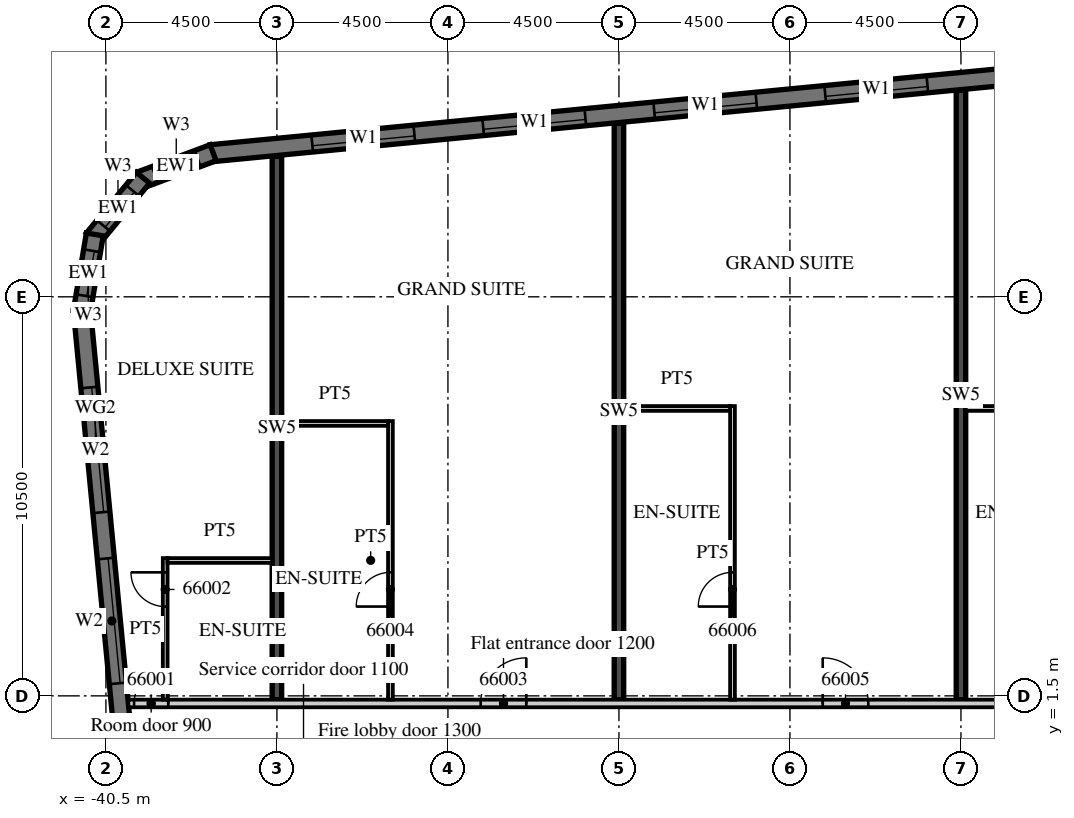
"""IFC4 building model, lengths in metres.
Left out: names, types, materials, properties, quantities, classifications, styles, units other than length and angle.
Written with IfcOpenShell. Run it as: python <this file> out.ifc"""

import sys

from ifc_helpers import new_model, si_unit, direction, frame, frame_2d, origin, place, context, subcontext, project, spatial, polyline, rectangle, outline, extrude, element, fill, save


model = new_model("IFC4")
c1 = context("Model", 3, precision=1e-05, world=origin(), true_north=direction((0.0, 1.0)))
c2 = subcontext(c1, "Body", "Model", "MODEL_VIEW")
j1 = project(units=[si_unit("LENGTHUNIT", "METRE"), si_unit("PLANEANGLEUNIT", "RADIAN")], contexts=[c1])
p1 = place(None, origin())
s1 = spatial("IfcSite", under=j1, at=p1, CompositionType="ELEMENT")
p2 = place(p1, origin())
s2 = spatial("IfcBuilding", under=s1, at=p2, CompositionType="ELEMENT")
p3 = place(p2, frame((0.0, 0.0, 268.5)))
s3 = spatial("IfcBuildingStorey", under=s2, at=p3, CompositionType="ELEMENT", Elevation=268.5)
p4 = place(p3, frame((-36.0, 1.4, 0.0), z_axis=(0.0, 0.0, 1.0), x_axis=(0.0, 1.0, 0.0)))
e1 = element("IfcWall", 1, at=p4, inside=s3, PredefinedType="SHEAR", context=c2, shape_type="SweptSolid", body=[
    extrude(rectangle(XDim=14.296, YDim=0.25, at=frame_2d((7.148, 0.0))), origin(), (0.0, 0.0, 1.0), 3.3),
])
p5 = place(p3, frame((-27.0, 1.4, 0.0), z_axis=(0.0, 0.0, 1.0), x_axis=(0.0, 1.0, 0.0)))
e2 = element("IfcWall", 2, at=p5, inside=s3, PredefinedType="SHEAR", context=c2, shape_type="SweptSolid", body=[
    extrude(rectangle(XDim=15.163, YDim=0.25, at=frame_2d((7.582, 0.0))), origin(), (0.0, 0.0, 1.0), 3.3),
])
p6 = place(p3, frame((-18.0, 1.4, 0.0), z_axis=(0.0, 0.0, 1.0), x_axis=(0.0, 1.0, 0.0)))
e3 = element("IfcWall", 3, at=p6, inside=s3, PredefinedType="SHEAR", context=c2, shape_type="SweptSolid", body=[
    extrude(rectangle(XDim=16.03, YDim=0.25, at=frame_2d((8.015, 0.0))), origin(), (0.0, 0.0, 1.0), 3.3),
])
p7 = place(p3, frame((-41.132, 11.658, 0.0), z_axis=(0.0, 0.0, 1.0), x_axis=(0.095847749461, -0.995396006082, 0.0)))
e4 = element("IfcWall", 4, at=p7, inside=s3, PredefinedType="SOLIDWALL", context=c2, shape_type="SweptSolid", body=[
    extrude(rectangle(XDim=32.0, YDim=0.45, at=frame_2d((16.0, 0.0))), origin(), (0.0, 0.0, 1.0), 3.02),
])
p8 = place(p7, frame((2.053, 0.0, 0.45)))
e5 = element("IfcOpeningElement", 5, at=p8, cuts=e4, PredefinedType="OPENING", context=c2, shape_type="SweptSolid", body=[
    extrude(rectangle(XDim=3.3, YDim=2.25, at=frame_2d((1.65, 1.125))), frame((0.0, 0.235, 0.0), z_axis=(0.0, -1.0, 0.0), x_axis=(1.0, 0.0, 0.0)), (0.0, 0.0, 1.0), 0.47),
])
p9 = place(p7, frame((6.574, 0.0, 0.45)))
e6 = element("IfcOpeningElement", 6, at=p9, cuts=e4, PredefinedType="OPENING", context=c2, shape_type="SweptSolid", body=[
    extrude(rectangle(XDim=3.3, YDim=2.25, at=frame_2d((1.65, 1.125))), frame((0.0, 0.235, 0.0), z_axis=(0.0, -1.0, 0.0), x_axis=(1.0, 0.0, 0.0)), (0.0, 0.0, 1.0), 0.47),
])
p10 = place(p3, frame((13.521, 20.713, 0.0), z_axis=(0.0, 0.0, 1.0), x_axis=(-0.995396277313, -0.095844932638, 0.0)))
e7 = element("IfcWall", 7, at=p10, inside=s3, PredefinedType="SOLIDWALL", context=c2, shape_type="SweptSolid", body=[
    extrude(rectangle(XDim=51.495, YDim=0.45, at=frame_2d((25.748, 0.0))), origin(), (0.0, 0.0, 1.0), 3.02),
])
p11 = place(p10, frame((0.91, 0.0, 0.45)))
e8 = element("IfcOpeningElement", 8, at=p11, cuts=e7, PredefinedType="OPENING", context=c2, shape_type="SweptSolid", body=[
    extrude(rectangle(XDim=2.7, YDim=2.25, at=frame_2d((1.35, 1.125))), frame((0.0, 0.235, 0.0), z_axis=(0.0, -1.0, 0.0), x_axis=(1.0, 0.0, 0.0)), (0.0, 0.0, 1.0), 0.47),
])
p12 = place(p10, frame((5.431, 0.0, 0.45)))
e9 = element("IfcOpeningElement", 9, at=p12, cuts=e7, PredefinedType="OPENING", context=c2, shape_type="SweptSolid", body=[
    extrude(rectangle(XDim=2.7, YDim=2.25, at=frame_2d((1.35, 1.125))), frame((0.0, 0.235, 0.0), z_axis=(0.0, -1.0, 0.0), x_axis=(1.0, 0.0, 0.0)), (0.0, 0.0, 1.0), 0.47),
])
p13 = place(p10, frame((9.952, 0.0, 0.45)))
e10 = element("IfcOpeningElement", 10, at=p13, cuts=e7, PredefinedType="OPENING", context=c2, shape_type="SweptSolid", body=[
    extrude(rectangle(XDim=2.7, YDim=2.25, at=frame_2d((1.35, 1.125))), frame((0.0, 0.235, 0.0), z_axis=(0.0, -1.0, 0.0), x_axis=(1.0, 0.0, 0.0)), (0.0, 0.0, 1.0), 0.47),
])
p14 = place(p10, frame((14.473, 0.0, 0.45)))
e11 = element("IfcOpeningElement", 11, at=p14, cuts=e7, PredefinedType="OPENING", context=c2, shape_type="SweptSolid", body=[
    extrude(rectangle(XDim=2.7, YDim=2.25, at=frame_2d((1.35, 1.125))), frame((0.0, 0.235, 0.0), z_axis=(0.0, -1.0, 0.0), x_axis=(1.0, 0.0, 0.0)), (0.0, 0.0, 1.0), 0.47),
])
p15 = place(p10, frame((18.994, 0.0, 0.45)))
e12 = element("IfcOpeningElement", 12, at=p15, cuts=e7, PredefinedType="OPENING", context=c2, shape_type="SweptSolid", body=[
    extrude(rectangle(XDim=2.7, YDim=2.25, at=frame_2d((1.35, 1.125))), frame((0.0, 0.235, 0.0), z_axis=(0.0, -1.0, 0.0), x_axis=(1.0, 0.0, 0.0)), (0.0, 0.0, 1.0), 0.47),
])
p16 = place(p10, frame((23.514, 0.0, 0.45)))
e13 = element("IfcOpeningElement", 13, at=p16, cuts=e7, PredefinedType="OPENING", context=c2, shape_type="SweptSolid", body=[
    extrude(rectangle(XDim=2.7, YDim=2.25, at=frame_2d((1.35, 1.125))), frame((0.0, 0.235, 0.0), z_axis=(0.0, -1.0, 0.0), x_axis=(1.0, 0.0, 0.0)), (0.0, 0.0, 1.0), 0.47),
])
p17 = place(p10, frame((28.035, 0.0, 0.45)))
e14 = element("IfcOpeningElement", 14, at=p17, cuts=e7, PredefinedType="OPENING", context=c2, shape_type="SweptSolid", body=[
    extrude(rectangle(XDim=2.7, YDim=2.25, at=frame_2d((1.35, 1.125))), frame((0.0, 0.235, 0.0), z_axis=(0.0, -1.0, 0.0), x_axis=(1.0, 0.0, 0.0)), (0.0, 0.0, 1.0), 0.47),
])
p18 = place(p10, frame((32.556, 0.0, 0.45)))
e15 = element("IfcOpeningElement", 15, at=p18, cuts=e7, PredefinedType="OPENING", context=c2, shape_type="SweptSolid", body=[
    extrude(rectangle(XDim=2.7, YDim=2.25, at=frame_2d((1.35, 1.125))), frame((0.0, 0.235, 0.0), z_axis=(0.0, -1.0, 0.0), x_axis=(1.0, 0.0, 0.0)), (0.0, 0.0, 1.0), 0.47),
])
p19 = place(p10, frame((37.077, 0.0, 0.45)))
e16 = element("IfcOpeningElement", 16, at=p19, cuts=e7, PredefinedType="OPENING", context=c2, shape_type="SweptSolid", body=[
    extrude(rectangle(XDim=2.7, YDim=2.25, at=frame_2d((1.35, 1.125))), frame((0.0, 0.235, 0.0), z_axis=(0.0, -1.0, 0.0), x_axis=(1.0, 0.0, 0.0)), (0.0, 0.0, 1.0), 0.47),
])
p20 = place(p10, frame((41.598, 0.0, 0.45)))
e17 = element("IfcOpeningElement", 17, at=p20, cuts=e7, PredefinedType="OPENING", context=c2, shape_type="SweptSolid", body=[
    extrude(rectangle(XDim=2.7, YDim=2.25, at=frame_2d((1.35, 1.125))), frame((0.0, 0.235, 0.0), z_axis=(0.0, -1.0, 0.0), x_axis=(1.0, 0.0, 0.0)), (0.0, 0.0, 1.0), 0.47),
])
p21 = place(p10, frame((46.118, 0.0, 0.45)))
e18 = element("IfcOpeningElement", 18, at=p21, cuts=e7, PredefinedType="OPENING", context=c2, shape_type="SweptSolid", body=[
    extrude(rectangle(XDim=2.7, YDim=2.25, at=frame_2d((1.35, 1.125))), frame((0.0, 0.235, 0.0), z_axis=(0.0, -1.0, 0.0), x_axis=(1.0, 0.0, 0.0)), (0.0, 0.0, 1.0), 0.47),
])
p22 = place(p3, frame((-37.679, 15.791, 0.0), z_axis=(0.0, 0.0, 1.0), x_axis=(-0.936677599948, -0.350192909346, 0.0)))
e19 = element("IfcWall", 19, at=p22, inside=s3, PredefinedType="SOLIDWALL", context=c2, shape_type="SweptSolid", body=[
    extrude(outline(polyline([(0.0, -0.225), (2.071, -0.225), (1.95, 0.225), (0.121, 0.225), (0.0, -0.225)])), origin(), (0.0, 0.0, 1.0), 3.02),
])
p23 = place(p22, frame((0.435, 0.0, 0.45)))
e20 = element("IfcOpeningElement", 20, at=p23, cuts=e19, PredefinedType="OPENING", context=c2, shape_type="SweptSolid", body=[
    extrude(rectangle(XDim=1.2, YDim=2.25, at=frame_2d((0.6, 1.125))), frame((0.0, 0.235, 0.0), z_axis=(0.0, -1.0, 0.0), x_axis=(1.0, 0.0, 0.0)), (0.0, 0.0, 1.0), 0.47),
])
p24 = place(p3, frame((-39.524, 15.133, 0.0), z_axis=(0.0, 0.0, 1.0), x_axis=(-0.636046112757, -0.771651049663, 0.0)))
e21 = element("IfcWall", 21, at=p24, inside=s3, PredefinedType="SOLIDWALL", context=c2, shape_type="SweptSolid", body=[
    extrude(outline(polyline([(0.0, -0.225), (2.071, -0.225), (1.95, 0.225), (0.121, 0.225), (0.0, -0.225)])), origin(), (0.0, 0.0, 1.0), 3.02),
])
p25 = place(p24, frame((0.435, 0.0, 0.45)))
e22 = element("IfcOpeningElement", 22, at=p25, cuts=e21, PredefinedType="OPENING", context=c2, shape_type="SweptSolid", body=[
    extrude(rectangle(XDim=1.2, YDim=2.25, at=frame_2d((0.6, 1.125))), frame((0.0, 0.235, 0.0), z_axis=(0.0, -1.0, 0.0), x_axis=(1.0, 0.0, 0.0)), (0.0, 0.0, 1.0), 0.47),
])
p26 = place(p3, frame((-40.792, 13.641, 0.0), z_axis=(0.0, 0.0, 1.0), x_axis=(-0.165068144653, -0.986282164302, 0.0)))
e23 = element("IfcWall", 23, at=p26, inside=s3, PredefinedType="SOLIDWALL", context=c2, shape_type="SweptSolid", body=[
    extrude(outline(polyline([(0.0, -0.225), (2.071, -0.225), (1.95, 0.225), (0.121, 0.225), (0.0, -0.225)])), origin(), (0.0, 0.0, 1.0), 3.02),
])
p27 = place(p26, frame((0.435, 0.0, 0.45)))
e24 = element("IfcOpeningElement", 24, at=p27, cuts=e23, PredefinedType="OPENING", context=c2, shape_type="SweptSolid", body=[
    extrude(rectangle(XDim=1.2, YDim=2.25, at=frame_2d((0.6, 1.125))), frame((0.0, 0.235, 0.0), z_axis=(0.0, -1.0, 0.0), x_axis=(1.0, 0.0, 0.0)), (0.0, 0.0, 1.0), 0.47),
])
p28 = place(p3, frame((-39.909, 1.3, 0.0), z_axis=(0.0, 0.0, 1.0), x_axis=(1.0, 0.0, 0.0)))
e25 = element("IfcWall", 25, at=p28, inside=s3, PredefinedType="PARTITIONING", context=c2, shape_type="SweptSolid", body=[
    extrude(rectangle(XDim=53.409, YDim=0.2, at=frame_2d((26.705, 0.0))), origin(), (0.0, 0.0, 1.0), 3.02),
])
p29 = place(p28, frame((0.15, 0.0, 0.0)))
e26 = element("IfcOpeningElement", 26, at=p29, cuts=e25, PredefinedType="OPENING", context=c2, shape_type="SweptSolid", body=[
    extrude(rectangle(XDim=0.9, YDim=2.1, at=frame_2d((0.45, 1.05))), frame((0.0, 0.11, 0.0), z_axis=(0.0, -1.0, 0.0), x_axis=(1.0, 0.0, 0.0)), (0.0, 0.0, 1.0), 0.22),
])
p30 = place(p28, frame((9.271, 0.0, 0.0)))
e27 = element("IfcOpeningElement", 27, at=p30, cuts=e25, PredefinedType="OPENING", context=c2, shape_type="SweptSolid", body=[
    extrude(rectangle(XDim=1.2, YDim=2.1, at=frame_2d((0.6, 1.05))), frame((0.0, 0.11, 0.0), z_axis=(0.0, -1.0, 0.0), x_axis=(1.0, 0.0, 0.0)), (0.0, 0.0, 1.0), 0.22),
])
p31 = place(p28, frame((18.271, 0.0, 0.0)))
e28 = element("IfcOpeningElement", 28, at=p31, cuts=e25, PredefinedType="OPENING", context=c2, shape_type="SweptSolid", body=[
    extrude(rectangle(XDim=1.2, YDim=2.1, at=frame_2d((0.6, 1.05))), frame((0.0, 0.11, 0.0), z_axis=(0.0, -1.0, 0.0), x_axis=(1.0, 0.0, 0.0)), (0.0, 0.0, 1.0), 0.22),
])
p32 = place(p28, frame((27.271, 0.0, 0.0)))
e29 = element("IfcOpeningElement", 29, at=p32, cuts=e25, PredefinedType="OPENING", context=c2, shape_type="SweptSolid", body=[
    extrude(rectangle(XDim=1.2, YDim=2.1, at=frame_2d((0.6, 1.05))), frame((0.0, 0.11, 0.0), z_axis=(0.0, -1.0, 0.0), x_axis=(1.0, 0.0, 0.0)), (0.0, 0.0, 1.0), 0.22),
])
p33 = place(p28, frame((36.271, 0.0, 0.0)))
e30 = element("IfcOpeningElement", 30, at=p33, cuts=e25, PredefinedType="OPENING", context=c2, shape_type="SweptSolid", body=[
    extrude(rectangle(XDim=1.2, YDim=2.1, at=frame_2d((0.6, 1.05))), frame((0.0, 0.11, 0.0), z_axis=(0.0, -1.0, 0.0), x_axis=(1.0, 0.0, 0.0)), (0.0, 0.0, 1.0), 0.22),
])
p34 = place(p28, frame((42.346, 0.0, 0.0)))
e31 = element("IfcOpeningElement", 31, at=p34, cuts=e25, PredefinedType="OPENING", context=c2, shape_type="SweptSolid", body=[
    extrude(rectangle(XDim=1.2, YDim=2.1, at=frame_2d((0.6, 1.05))), frame((0.0, 0.11, 0.0), z_axis=(0.0, -1.0, 0.0), x_axis=(1.0, 0.0, 0.0)), (0.0, 0.0, 1.0), 0.22),
])
p35 = place(p28, frame((51.834, 0.0, 0.0)))
e32 = element("IfcOpeningElement", 32, at=p35, cuts=e25, PredefinedType="OPENING", context=c2, shape_type="SweptSolid", body=[
    extrude(rectangle(XDim=1.0, YDim=2.1, at=frame_2d((0.5, 1.05))), frame((0.0, 0.11, 0.0), z_axis=(0.0, -1.0, 0.0), x_axis=(1.0, 0.0, 0.0)), (0.0, 0.0, 1.0), 0.22),
])
p36 = place(p3, frame((-38.94, 1.4, 0.0), z_axis=(0.0, 0.0, 1.0), x_axis=(0.0, 1.0, 0.0)))
e33 = element("IfcWall", 33, at=p36, inside=s3, PredefinedType="PARTITIONING", context=c2, shape_type="SweptSolid", body=[
    extrude(rectangle(XDim=3.725, YDim=0.125, at=frame_2d((1.863, 0.0))), origin(), (0.0, 0.0, 1.0), 3.02),
])
p37 = place(p36, frame((2.45, 0.0, 0.0)))
e34 = element("IfcOpeningElement", 34, at=p37, cuts=e33, PredefinedType="OPENING", context=c2, shape_type="SweptSolid", body=[
    extrude(rectangle(XDim=0.9, YDim=2.1, at=frame_2d((0.45, 1.05))), frame((0.0, 0.073, 0.0), z_axis=(0.0, -1.0, 0.0), x_axis=(1.0, 0.0, 0.0)), (0.0, 0.0, 1.0), 0.145),
])
p38 = place(p3, frame((-38.878, 5.062, 0.0), z_axis=(0.0, 0.0, 1.0), x_axis=(1.0, 0.0, 0.0)))
e35 = element("IfcWall", 35, at=p38, inside=s3, PredefinedType="PARTITIONING", context=c2, shape_type="SweptSolid", body=[
    extrude(rectangle(XDim=2.753, YDim=0.125, at=frame_2d((1.376, 0.0))), origin(), (0.0, 0.0, 1.0), 3.02),
])
p39 = place(p3, frame((-33.013, 1.4, 0.0), z_axis=(0.0, 0.0, 1.0), x_axis=(0.0, 1.0, 0.0)))
e36 = element("IfcWall", 36, at=p39, inside=s3, PredefinedType="PARTITIONING", context=c2, shape_type="SweptSolid", body=[
    extrude(rectangle(XDim=7.33, YDim=0.125, at=frame_2d((3.665, 0.0))), origin(), (0.0, 0.0, 1.0), 3.02),
])
p40 = place(p39, frame((2.45, 0.0, 0.0)))
e37 = element("IfcOpeningElement", 37, at=p40, cuts=e36, PredefinedType="OPENING", context=c2, shape_type="SweptSolid", body=[
    extrude(rectangle(XDim=0.9, YDim=2.1, at=frame_2d((0.45, 1.05))), frame((0.0, 0.073, 0.0), z_axis=(0.0, -1.0, 0.0), x_axis=(1.0, 0.0, 0.0)), (0.0, 0.0, 1.0), 0.145),
])
p41 = place(p3, frame((-35.875, 8.668, 0.0), z_axis=(0.0, 0.0, 1.0), x_axis=(1.0, 0.0, 0.0)))
e38 = element("IfcWall", 38, at=p41, inside=s3, PredefinedType="PARTITIONING", context=c2, shape_type="SweptSolid", body=[
    extrude(rectangle(XDim=2.8, YDim=0.125, at=frame_2d((1.4, 0.0))), origin(), (0.0, 0.0, 1.0), 3.02),
])
p42 = place(p3, frame((-24.012, 1.4, 0.0), z_axis=(0.0, 0.0, 1.0), x_axis=(0.0, 1.0, 0.0)))
e39 = element("IfcWall", 39, at=p42, inside=s3, PredefinedType="PARTITIONING", context=c2, shape_type="SweptSolid", body=[
    extrude(rectangle(XDim=7.725, YDim=0.125, at=frame_2d((3.863, 0.0))), origin(), (0.0, 0.0, 1.0), 3.02),
])
p43 = place(p42, frame((2.45, 0.0, 0.0)))
e40 = element("IfcOpeningElement", 40, at=p43, cuts=e39, PredefinedType="OPENING", context=c2, shape_type="SweptSolid", body=[
    extrude(rectangle(XDim=0.9, YDim=2.1, at=frame_2d((0.45, 1.05))), frame((0.0, 0.073, 0.0), z_axis=(0.0, -1.0, 0.0), x_axis=(1.0, 0.0, 0.0)), (0.0, 0.0, 1.0), 0.145),
])
for number, where, z_axis, x_axis in (
    (41, (-26.875, 9.062, 0.0), (0.0, 0.0, 1.0), (1.0, 0.0, 0.0)),
    (42, (-17.875, 9.062, 0.0), (0.0, 0.0, 1.0), (1.0, 0.0, 0.0)),
):
    element("IfcWall", number, at=place(p3, frame(where, z_axis=z_axis, x_axis=x_axis)), inside=s3, PredefinedType="PARTITIONING", context=c2, shape_type="SweptSolid", body=[
        extrude(rectangle(XDim=2.8, YDim=0.125, at=frame_2d((1.4, 0.0))), origin(), (0.0, 0.0, 1.0), 3.02),
    ])
p44 = place(p8, origin())
e43 = element("IfcWindow", 43, at=p44, inside=s3, PartitioningType="SINGLE_PANEL", PredefinedType="WINDOW", context=c2, shape_type="SweptSolid", body=[
    extrude(rectangle(XDim=3.3, YDim=2.25, at=frame_2d((1.65, 1.125))), frame((0.0, 0.09, 0.0), z_axis=(0.0, -1.0, 0.0), x_axis=(1.0, 0.0, 0.0)), (0.0, 0.0, 1.0), 0.06),
])
fill(e5, e43)
p45 = place(p9, origin())
e44 = element("IfcWindow", 44, at=p45, inside=s3, PartitioningType="SINGLE_PANEL", PredefinedType="WINDOW", context=c2, shape_type="SweptSolid", body=[
    extrude(rectangle(XDim=3.3, YDim=2.25, at=frame_2d((1.65, 1.125))), frame((0.0, 0.09, 0.0), z_axis=(0.0, -1.0, 0.0), x_axis=(1.0, 0.0, 0.0)), (0.0, 0.0, 1.0), 0.06),
])
fill(e6, e44)
p46 = place(p18, origin())
e45 = element("IfcWindow", 45, at=p46, inside=s3, PartitioningType="SINGLE_PANEL", PredefinedType="WINDOW", context=c2, shape_type="SweptSolid", body=[
    extrude(rectangle(XDim=2.7, YDim=2.25, at=frame_2d((1.35, 1.125))), frame((0.0, 0.09, 0.0), z_axis=(0.0, -1.0, 0.0), x_axis=(1.0, 0.0, 0.0)), (0.0, 0.0, 1.0), 0.06),
])
fill(e15, e45)
p47 = place(p19, origin())
e46 = element("IfcWindow", 46, at=p47, inside=s3, PartitioningType="SINGLE_PANEL", PredefinedType="WINDOW", context=c2, shape_type="SweptSolid", body=[
    extrude(rectangle(XDim=2.7, YDim=2.25, at=frame_2d((1.35, 1.125))), frame((0.0, 0.09, 0.0), z_axis=(0.0, -1.0, 0.0), x_axis=(1.0, 0.0, 0.0)), (0.0, 0.0, 1.0), 0.06),
])
fill(e16, e46)
p48 = place(p20, origin())
e47 = element("IfcWindow", 47, at=p48, inside=s3, PartitioningType="SINGLE_PANEL", PredefinedType="WINDOW", context=c2, shape_type="SweptSolid", body=[
    extrude(rectangle(XDim=2.7, YDim=2.25, at=frame_2d((1.35, 1.125))), frame((0.0, 0.09, 0.0), z_axis=(0.0, -1.0, 0.0), x_axis=(1.0, 0.0, 0.0)), (0.0, 0.0, 1.0), 0.06),
])
fill(e17, e47)
p49 = place(p21, origin())
e48 = element("IfcWindow", 48, at=p49, inside=s3, PartitioningType="SINGLE_PANEL", PredefinedType="WINDOW", context=c2, shape_type="SweptSolid", body=[
    extrude(rectangle(XDim=2.7, YDim=2.25, at=frame_2d((1.35, 1.125))), frame((0.0, 0.09, 0.0), z_axis=(0.0, -1.0, 0.0), x_axis=(1.0, 0.0, 0.0)), (0.0, 0.0, 1.0), 0.06),
])
fill(e18, e48)
p50 = place(p23, origin())
e49 = element("IfcWindow", 49, at=p50, inside=s3, PartitioningType="SINGLE_PANEL", PredefinedType="WINDOW", context=c2, shape_type="SweptSolid", body=[
    extrude(rectangle(XDim=1.2, YDim=2.25, at=frame_2d((0.6, 1.125))), frame((0.0, 0.09, 0.0), z_axis=(0.0, -1.0, 0.0), x_axis=(1.0, 0.0, 0.0)), (0.0, 0.0, 1.0), 0.06),
])
fill(e20, e49)
p51 = place(p25, origin())
e50 = element("IfcWindow", 50, at=p51, inside=s3, PartitioningType="SINGLE_PANEL", PredefinedType="WINDOW", context=c2, shape_type="SweptSolid", body=[
    extrude(rectangle(XDim=1.2, YDim=2.25, at=frame_2d((0.6, 1.125))), frame((0.0, 0.09, 0.0), z_axis=(0.0, -1.0, 0.0), x_axis=(1.0, 0.0, 0.0)), (0.0, 0.0, 1.0), 0.06),
])
fill(e22, e50)
p52 = place(p27, origin())
e51 = element("IfcWindow", 51, at=p52, inside=s3, PartitioningType="SINGLE_PANEL", PredefinedType="WINDOW", context=c2, shape_type="SweptSolid", body=[
    extrude(rectangle(XDim=1.2, YDim=2.25, at=frame_2d((0.6, 1.125))), frame((0.0, 0.09, 0.0), z_axis=(0.0, -1.0, 0.0), x_axis=(1.0, 0.0, 0.0)), (0.0, 0.0, 1.0), 0.06),
])
fill(e24, e51)
p53 = place(p29, origin())
e52 = element("IfcDoor", 52, at=p53, inside=s3, OperationType="SINGLE_SWING_RIGHT", PredefinedType="DOOR", context=c2, shape_type="SweptSolid", body=[
    extrude(rectangle(XDim=0.9, YDim=2.1, at=frame_2d((0.45, 1.05))), frame((0.0, 0.025, 0.0), z_axis=(0.0, -1.0, 0.0), x_axis=(1.0, 0.0, 0.0)), (0.0, 0.0, 1.0), 0.05),
])
fill(e26, e52)
p54 = place(p37, origin())
e53 = element("IfcDoor", 53, at=p54, inside=s3, OperationType="SINGLE_SWING_RIGHT", PredefinedType="DOOR", context=c2, shape_type="SweptSolid", body=[
    extrude(rectangle(XDim=0.9, YDim=2.1, at=frame_2d((0.45, 1.05))), frame((0.0, 0.025, 0.0), z_axis=(0.0, -1.0, 0.0), x_axis=(1.0, 0.0, 0.0)), (0.0, 0.0, 1.0), 0.05),
])
fill(e34, e53)
p55 = place(p30, origin())
e54 = element("IfcDoor", 54, at=p55, inside=s3, OperationType="SINGLE_SWING_RIGHT", PredefinedType="DOOR", context=c2, shape_type="SweptSolid", body=[
    extrude(rectangle(XDim=1.2, YDim=2.1, at=frame_2d((0.6, 1.05))), frame((0.0, 0.025, 0.0), z_axis=(0.0, -1.0, 0.0), x_axis=(1.0, 0.0, 0.0)), (0.0, 0.0, 1.0), 0.05),
])
fill(e27, e54)
p56 = place(p40, origin())
e55 = element("IfcDoor", 55, at=p56, inside=s3, OperationType="SINGLE_SWING_LEFT", PredefinedType="DOOR", context=c2, shape_type="SweptSolid", body=[
    extrude(rectangle(XDim=0.9, YDim=2.1, at=frame_2d((0.45, 1.05))), frame((0.0, 0.025, 0.0), z_axis=(0.0, -1.0, 0.0), x_axis=(1.0, 0.0, 0.0)), (0.0, 0.0, 1.0), 0.05),
])
fill(e37, e55)
p57 = place(p31, origin())
e56 = element("IfcDoor", 56, at=p57, inside=s3, OperationType="SINGLE_SWING_LEFT", PredefinedType="DOOR", context=c2, shape_type="SweptSolid", body=[
    extrude(rectangle(XDim=1.2, YDim=2.1, at=frame_2d((0.6, 1.05))), frame((0.0, 0.025, 0.0), z_axis=(0.0, -1.0, 0.0), x_axis=(1.0, 0.0, 0.0)), (0.0, 0.0, 1.0), 0.05),
])
fill(e28, e56)
p58 = place(p43, origin())
e57 = element("IfcDoor", 57, at=p58, inside=s3, OperationType="SINGLE_SWING_LEFT", PredefinedType="DOOR", context=c2, shape_type="SweptSolid", body=[
    extrude(rectangle(XDim=0.9, YDim=2.1, at=frame_2d((0.45, 1.05))), frame((0.0, 0.025, 0.0), z_axis=(0.0, -1.0, 0.0), x_axis=(1.0, 0.0, 0.0)), (0.0, 0.0, 1.0), 0.05),
])
fill(e40, e57)
save(model, sys.argv[1])
